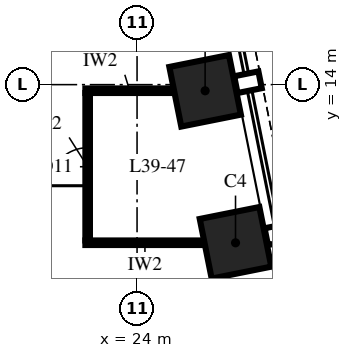
"""IFC4 building model, lengths in metres.
Left out: names, types, materials, properties, quantities, classifications, styles, units other than length and angle.
Written with IfcOpenShell. Run it as: python <this file> out.ifc"""

import sys

from ifc_helpers import new_model, si_unit, direction, frame, frame_2d, origin, origin_2d, place, context, subcontext, project, spatial, rectangle, extrude, element, fill, save


model = new_model("IFC4")
c1 = context("Model", 3, precision=1e-05, world=origin(), true_north=direction((0.0, 1.0)))
c2 = subcontext(c1, "Body", "Model", "MODEL_VIEW")
j1 = project(units=[si_unit("LENGTHUNIT", "METRE"), si_unit("PLANEANGLEUNIT", "RADIAN")], contexts=[c1])
p1 = place(None, origin())
s1 = spatial("IfcSite", under=j1, at=p1, CompositionType="ELEMENT")
p2 = place(p1, origin())
s2 = spatial("IfcBuilding", under=s1, at=p2, CompositionType="ELEMENT")
p3 = place(p2, frame((0.0, 0.0, 173.0)))
s3 = spatial("IfcBuildingStorey", under=s2, at=p3, CompositionType="ELEMENT", Elevation=173.0)
for number, where, z_axis, x_axis in (
    (1, (26.591, 9.838, 0.0), (0.0, 0.0, 1.0), (-0.196, 0.981, 0.0)),
    (2, (25.791, 13.838, 0.0), (0.0, 0.0, 1.0), (-0.196, 0.981, 0.0)),
):
    element("IfcColumn", number, at=place(p3, frame(where, z_axis=z_axis, x_axis=x_axis)), inside=s3, PredefinedType="COLUMN", context=c2, shape_type="SweptSolid", body=[
        extrude(rectangle(XDim=1.6, YDim=1.6, at=origin_2d()), origin(), (0.0, 0.0, 1.0), 5.0),
    ])
p4 = place(p3, frame((22.64, 9.84, 0.0), z_axis=(0.0, 0.0, 1.0), x_axis=(1.0, 0.0, 0.0)))
e3 = element("IfcWall", 3, at=p4, inside=s3, PredefinedType="PARTITIONING", context=c2, shape_type="SweptSolid", body=[
    extrude(rectangle(XDim=3.135, YDim=0.12, at=frame_2d((1.567, 0.0))), origin(), (0.0, 0.0, 1.0), 4.25),
])
p5 = place(p3, frame((22.64, 13.84, 0.0), z_axis=(0.0, 0.0, 1.0), x_axis=(1.0, 0.0, 0.0)))
e4 = element("IfcWall", 4, at=p5, inside=s3, PredefinedType="PARTITIONING", context=c2, shape_type="SweptSolid", body=[
    extrude(rectangle(XDim=2.335, YDim=0.12, at=frame_2d((1.167, 0.0))), origin(), (0.0, 0.0, 1.0), 4.25),
])
p6 = place(p3, frame((22.7, 9.9, 0.0), z_axis=(0.0, 0.0, 1.0), x_axis=(0.0, 1.0, 0.0)))
e5 = element("IfcWall", 5, at=p6, inside=s3, PredefinedType="PARTITIONING", context=c2, shape_type="SweptSolid", body=[
    extrude(rectangle(XDim=3.88, YDim=0.12, at=frame_2d((1.94, 0.0))), origin(), (0.0, 0.0, 1.0), 4.85),
])
p7 = place(p6, frame((1.44, 0.0, 0.0)))
e6 = element("IfcOpeningElement", 6, at=p7, cuts=e5, PredefinedType="OPENING", context=c2, shape_type="SweptSolid", body=[
    extrude(rectangle(XDim=1.0, YDim=2.4, at=frame_2d((0.5, 1.2))), frame((0.0, 0.075, 0.0), z_axis=(0.0, -1.0, 0.0), x_axis=(1.0, 0.0, 0.0)), (0.0, 0.0, 1.0), 0.15),
])
p8 = place(p7, origin())
e7 = element("IfcDoor", 7, at=p8, inside=s3, OperationType="SINGLE_SWING_RIGHT", PredefinedType="DOOR", context=c2, shape_type="SweptSolid", body=[
    extrude(rectangle(XDim=1.0, YDim=2.4, at=frame_2d((0.5, 1.2))), frame((0.0, 0.06, 0.0), z_axis=(0.0, -1.0, 0.0), x_axis=(1.0, 0.0, 0.0)), (0.0, 0.0, 1.0), 0.12),
])
fill(e6, e7)
save(model, sys.argv[1])
